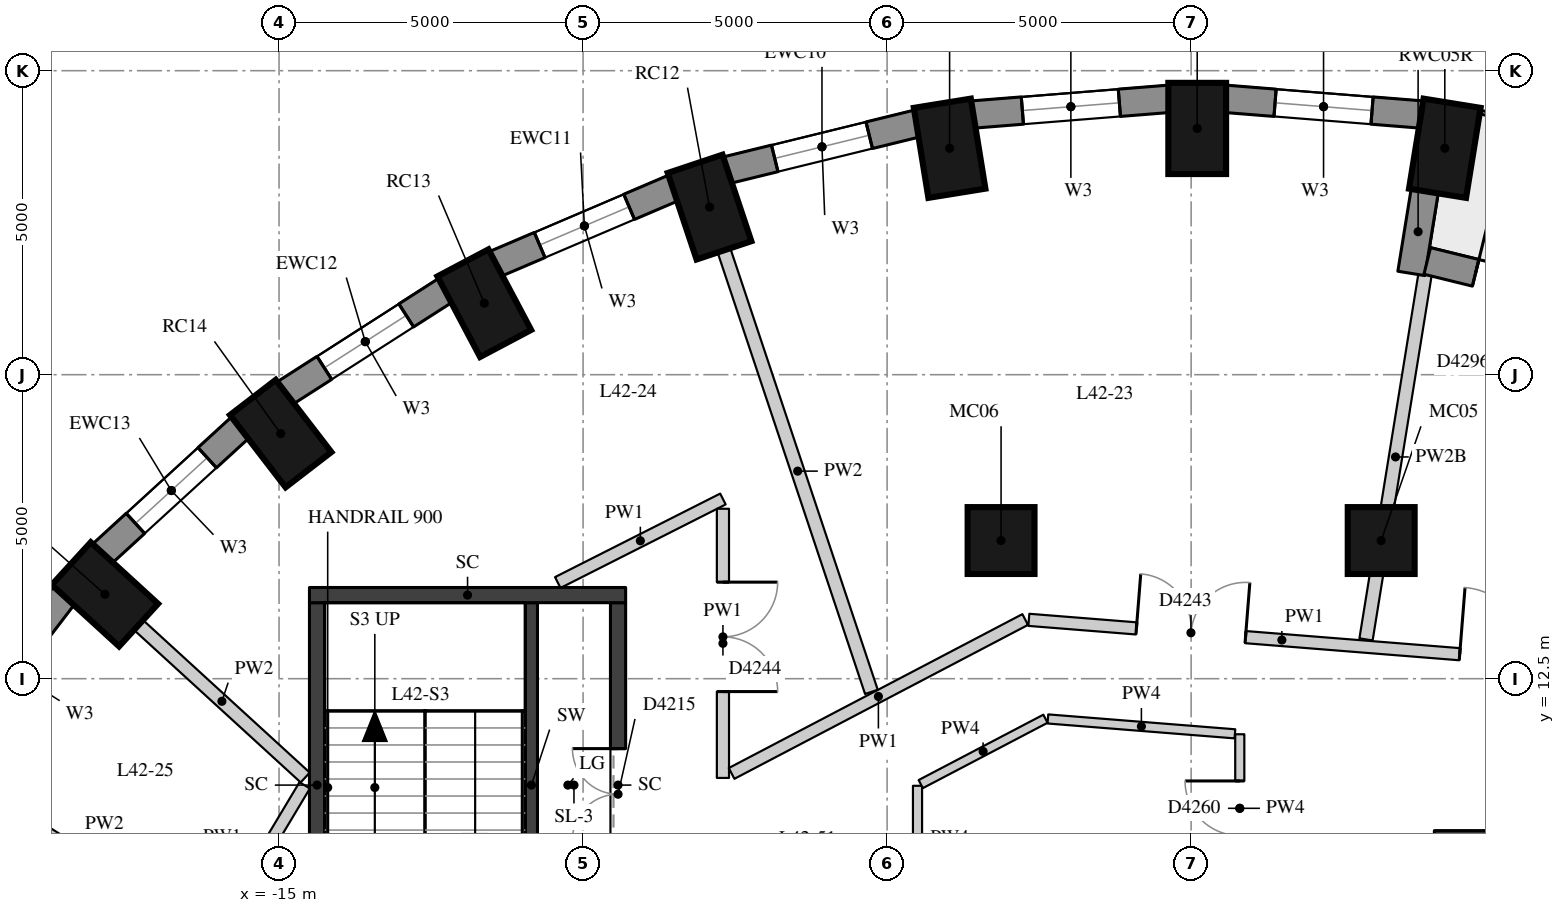
"""IFC4 building model, lengths in metres.
Left out: names, types, materials, properties, quantities, classifications, styles, units other than length and angle.
Written with IfcOpenShell. Run it as: python <this file> out.ifc"""

import sys

from ifc_helpers import new_model, si_unit, direction, frame, frame_2d, origin, origin_2d, place, context, subcontext, project, spatial, rectangle, extrude, element, fill, save


model = new_model("IFC4")
c1 = context("Model", 3, precision=1e-05, world=origin(), true_north=direction((0.0, 1.0)))
c2 = subcontext(c1, "Body", "Model", "MODEL_VIEW")
j1 = project(units=[si_unit("LENGTHUNIT", "METRE"), si_unit("PLANEANGLEUNIT", "RADIAN")], contexts=[c1])
p1 = place(None, origin())
s1 = spatial("IfcSite", under=j1, at=p1, CompositionType="ELEMENT")
p2 = place(p1, origin())
s2 = spatial("IfcBuilding", under=s1, at=p2, CompositionType="ELEMENT")
p3 = place(p2, frame((0.0, 0.0, 151.7)))
s3 = spatial("IfcBuildingStorey", under=s2, at=p3, CompositionType="ELEMENT", Elevation=151.7)
for number, where, z_axis, x_axis in (
    (1, (4.172, 21.224, 0.0), (0.0, 0.0, 1.0), (0.16, 0.987, 0.0)),
    (2, (0.1, 21.55, 0.0), (0.0, 0.0, 1.0), (0.0, 1.0, 0.0)),
    (3, (-3.972, 21.224, 0.0), (0.0, 0.0, 1.0), (-0.16, 0.987, 0.0)),
    (4, (-7.92, 20.256, 0.0), (0.0, 0.0, 1.0), (-0.317, 0.949, 0.0)),
    (5, (-11.625, 18.676, 0.0), (0.0, 0.0, 1.0), (-0.468, 0.884, 0.0)),
    (6, (-14.973, 16.532, 0.0), (0.0, 0.0, 1.0), (-0.61, 0.792, 0.0)),
    (7, (-17.864, 13.888, 0.0), (0.0, 0.0, 1.0), (-0.738, 0.675, 0.0)),
):
    element("IfcColumn", number, at=place(p3, frame(where, z_axis=z_axis, x_axis=x_axis)), inside=s3, PredefinedType="COLUMN", context=c2, shape_type="SweptSolid", body=[
        extrude(rectangle(XDim=1.5, YDim=0.95, at=origin_2d()), origin(), (0.0, 0.0, 1.0), 3.3),
    ])
for number, where, z_axis, x_axis in (
    (8, (3.126, 14.772, 0.0), (0.0, 0.0, 1.0), (1.0, 0.0, 0.0)),
    (9, (-3.126, 14.772, 0.0), (0.0, 0.0, 1.0), (1.0, 0.0, 0.0)),
):
    element("IfcColumn", number, at=place(p3, frame(where, z_axis=z_axis, x_axis=x_axis)), inside=s3, PredefinedType="COLUMN", context=c2, shape_type="SweptSolid", body=[
        extrude(rectangle(XDim=1.1, YDim=1.1, at=origin_2d()), origin(), (0.0, 0.0, 1.0), 3.3),
    ])
p4 = place(p3, frame((3.801, 21.778, 0.0), z_axis=(0.0, 0.0, 1.0), x_axis=(-0.996812416891, 0.079780984773, 0.0)))
e10 = element("IfcWall", 10, at=p4, inside=s3, PredefinedType="SOLIDWALL", context=c2, shape_type="SweptSolid", body=[
    extrude(rectangle(XDim=3.256, YDim=0.45, at=frame_2d((1.628, 0.0))), origin(), (0.0, 0.0, 1.0), 3.02),
])
p5 = place(p4, frame((0.828, 0.0, 0.4)))
e11 = element("IfcOpeningElement", 11, at=p5, cuts=e10, PredefinedType="OPENING", context=c2, shape_type="SweptSolid", body=[
    extrude(rectangle(XDim=1.6, YDim=1.75, at=frame_2d((0.8, 0.875))), frame((0.0, 0.235, 0.0), z_axis=(0.0, -1.0, 0.0), x_axis=(1.0, 0.0, 0.0)), (0.0, 0.0, 1.0), 0.47),
])
p6 = place(p3, frame((-0.355, 22.038, 0.0), z_axis=(0.0, 0.0, 1.0), x_axis=(-0.996812416891, -0.079780984773, 0.0)))
e12 = element("IfcWall", 12, at=p6, inside=s3, PredefinedType="SOLIDWALL", context=c2, shape_type="SweptSolid", body=[
    extrude(rectangle(XDim=3.256, YDim=0.45, at=frame_2d((1.628, 0.0))), origin(), (0.0, 0.0, 1.0), 3.02),
])
p7 = place(p6, frame((0.828, 0.0, 0.4)))
e13 = element("IfcOpeningElement", 13, at=p7, cuts=e12, PredefinedType="OPENING", context=c2, shape_type="SweptSolid", body=[
    extrude(rectangle(XDim=1.6, YDim=1.75, at=frame_2d((0.8, 0.875))), frame((0.0, 0.235, 0.0), z_axis=(0.0, -1.0, 0.0), x_axis=(1.0, 0.0, 0.0)), (0.0, 0.0, 1.0), 0.47),
])
p8 = place(p3, frame((-4.499, 21.633, 0.0), z_axis=(0.0, 0.0, 1.0), x_axis=(-0.971232901476, -0.238131583563, 0.0)))
e14 = element("IfcWall", 14, at=p8, inside=s3, PredefinedType="SOLIDWALL", context=c2, shape_type="SweptSolid", body=[
    extrude(rectangle(XDim=3.237, YDim=0.45, at=frame_2d((1.618, 0.0))), origin(), (0.0, 0.0, 1.0), 3.02),
])
p9 = place(p8, frame((0.818, 0.0, 0.4)))
e15 = element("IfcOpeningElement", 15, at=p9, cuts=e14, PredefinedType="OPENING", context=c2, shape_type="SweptSolid", body=[
    extrude(rectangle(XDim=1.6, YDim=1.75, at=frame_2d((0.8, 0.875))), frame((0.0, 0.235, 0.0), z_axis=(0.0, -1.0, 0.0), x_axis=(1.0, 0.0, 0.0)), (0.0, 0.0, 1.0), 0.47),
])
p10 = place(p3, frame((-8.506, 20.574, 0.0), z_axis=(0.0, 0.0, 1.0), x_axis=(-0.919798725687, -0.392390499663, 0.0)))
e16 = element("IfcWall", 16, at=p10, inside=s3, PredefinedType="SOLIDWALL", context=c2, shape_type="SweptSolid", body=[
    extrude(rectangle(XDim=3.2, YDim=0.45, at=frame_2d((1.6, 0.0))), origin(), (0.0, 0.0, 1.0), 3.02),
])
p11 = place(p10, frame((0.8, 0.0, 0.4)))
e17 = element("IfcOpeningElement", 17, at=p11, cuts=e16, PredefinedType="OPENING", context=c2, shape_type="SweptSolid", body=[
    extrude(rectangle(XDim=1.6, YDim=1.75, at=frame_2d((0.8, 0.875))), frame((0.0, 0.235, 0.0), z_axis=(0.0, -1.0, 0.0), x_axis=(1.0, 0.0, 0.0)), (0.0, 0.0, 1.0), 0.47),
])
p12 = place(p3, frame((-12.255, 18.893, 0.0), z_axis=(0.0, 0.0, 1.0), x_axis=(-0.842030726237, -0.539429565442, 0.0)))
e18 = element("IfcWall", 18, at=p12, inside=s3, PredefinedType="SOLIDWALL", context=c2, shape_type="SweptSolid", body=[
    extrude(rectangle(XDim=3.151, YDim=0.45, at=frame_2d((1.576, 0.0))), origin(), (0.0, 0.0, 1.0), 3.02),
])
p13 = place(p12, frame((0.776, 0.0, 0.4)))
e19 = element("IfcOpeningElement", 19, at=p13, cuts=e18, PredefinedType="OPENING", context=c2, shape_type="SweptSolid", body=[
    extrude(rectangle(XDim=1.6, YDim=1.75, at=frame_2d((0.8, 0.875))), frame((0.0, 0.235, 0.0), z_axis=(0.0, -1.0, 0.0), x_axis=(1.0, 0.0, 0.0)), (0.0, 0.0, 1.0), 0.47),
])
p14 = place(p3, frame((-15.63, 16.639, 0.0), z_axis=(0.0, 0.0, 1.0), x_axis=(-0.737808755941, -0.675009807082, 0.0)))
e20 = element("IfcWall", 20, at=p14, inside=s3, PredefinedType="SOLIDWALL", context=c2, shape_type="SweptSolid", body=[
    extrude(rectangle(XDim=3.094, YDim=0.45, at=frame_2d((1.547, 0.0))), origin(), (0.0, 0.0, 1.0), 3.02),
])
p15 = place(p14, frame((0.747, 0.0, 0.4)))
e21 = element("IfcOpeningElement", 21, at=p15, cuts=e20, PredefinedType="OPENING", context=c2, shape_type="SweptSolid", body=[
    extrude(rectangle(XDim=1.6, YDim=1.75, at=frame_2d((0.8, 0.875))), frame((0.0, 0.235, 0.0), z_axis=(0.0, -1.0, 0.0), x_axis=(1.0, 0.0, 0.0)), (0.0, 0.0, 1.0), 0.47),
])
p16 = place(p3, frame((-18.528, 13.879, 0.0), z_axis=(0.0, 0.0, 1.0), x_axis=(-0.607817056371, -0.794077090706, 0.0)))
e22 = element("IfcWall", 22, at=p16, inside=s3, PredefinedType="SOLIDWALL", context=c2, shape_type="SweptSolid", body=[
    extrude(rectangle(XDim=3.037, YDim=0.45, at=frame_2d((1.519, 0.0))), origin(), (0.0, 0.0, 1.0), 3.02),
])
p17 = place(p16, frame((0.719, 0.0, 0.4)))
e23 = element("IfcOpeningElement", 23, at=p17, cuts=e22, PredefinedType="OPENING", context=c2, shape_type="SweptSolid", body=[
    extrude(rectangle(XDim=1.6, YDim=1.75, at=frame_2d((0.8, 0.875))), frame((0.0, 0.235, 0.0), z_axis=(0.0, -1.0, 0.0), x_axis=(1.0, 0.0, 0.0)), (0.0, 0.0, 1.0), 0.47),
])
p18 = place(p3, frame((3.844, 20.538, 0.0), z_axis=(0.0, 0.0, 1.0), x_axis=(-0.159641024018, -0.98717513312, 0.0)))
e24 = element("IfcWall", 24, at=p18, inside=s3, PredefinedType="SOLIDWALL", context=c2, shape_type="SweptSolid", body=[
    extrude(rectangle(XDim=1.39, YDim=0.45, at=frame_2d((0.695, 0.0))), origin(), (0.0, 0.0, 1.0), 2.57),
])
p19 = place(p3, frame((7.563, 18.466, 0.0), z_axis=(0.0, 0.0, 1.0), x_axis=(-0.97110866251, 0.238637728782, 0.0)))
e25 = element("IfcWall", 25, at=p19, inside=s3, PredefinedType="SOLIDWALL", context=c2, shape_type="SweptSolid", body=[
    extrude(rectangle(XDim=3.789, YDim=0.45, at=frame_2d((1.895, 0.0))), origin(), (0.0, 0.0, 1.0), 3.02),
])
p20 = place(p19, frame((0.82, 0.0, 0.4)))
e26 = element("IfcOpeningElement", 26, at=p20, cuts=e25, PredefinedType="OPENING", context=c2, shape_type="SweptSolid", body=[
    extrude(rectangle(XDim=1.0, YDim=1.75, at=frame_2d((0.5, 0.875))), frame((0.0, 0.235, 0.0), z_axis=(0.0, -1.0, 0.0), x_axis=(1.0, 0.0, 0.0)), (0.0, 0.0, 1.0), 0.47),
])
p21 = place(p19, frame((1.97, 0.0, 0.0)))
e27 = element("IfcOpeningElement", 27, at=p21, cuts=e25, PredefinedType="OPENING", context=c2, shape_type="SweptSolid", body=[
    extrude(rectangle(XDim=1.0, YDim=2.15, at=frame_2d((0.5, 1.075))), frame((0.0, 0.235, 0.0), z_axis=(0.0, -1.0, 0.0), x_axis=(1.0, 0.0, 0.0)), (0.0, 0.0, 1.0), 0.47),
])
p22 = place(p3, frame((4.0, 9.7, 0.0), z_axis=(0.0, 0.0, 1.0), x_axis=(1.0, 0.0, 0.0)))
e28 = element("IfcWall", 28, at=p22, inside=s3, PredefinedType="SHEAR", context=c2, shape_type="SweptSolid", body=[
    extrude(rectangle(XDim=12.0, YDim=0.6, at=frame_2d((6.0, 0.0))), origin(), (0.0, 0.0, 1.0), 3.02),
])
p23 = place(p3, frame((-10.85, 7.75, 0.0), z_axis=(0.0, 0.0, 1.0), x_axis=(0.0, 1.0, 0.0)))
e29 = element("IfcWall", 29, at=p23, inside=s3, PredefinedType="SHEAR", context=c2, shape_type="SweptSolid", body=[
    extrude(rectangle(XDim=6.0, YDim=0.2, at=frame_2d((3.0, 0.0))), origin(), (0.0, 0.0, 1.0), 3.02),
])
p24 = place(p23, frame((0.1, 0.0, 0.0)))
e30 = element("IfcOpeningElement", 30, at=p24, cuts=e29, PredefinedType="OPENING", context=c2, shape_type="SweptSolid", body=[
    extrude(rectangle(XDim=1.5, YDim=2.1, at=frame_2d((0.75, 1.05))), frame((0.0, 0.11, 0.0), z_axis=(0.0, -1.0, 0.0), x_axis=(1.0, 0.0, 0.0)), (0.0, 0.0, 1.0), 0.22),
])
p25 = place(p3, frame((-14.375, 7.75, -0.28), z_axis=(0.0, 0.0, 1.0), x_axis=(0.0, 1.0, 0.0)))
e31 = element("IfcWall", 31, at=p25, inside=s3, PredefinedType="SHEAR", context=c2, shape_type="SweptSolid", body=[
    extrude(rectangle(XDim=6.0, YDim=0.25, at=frame_2d((3.0, 0.0))), origin(), (0.0, 0.0, 1.0), 3.3),
])
p26 = place(p3, frame((-9.425, 7.75, -0.28), z_axis=(0.0, 0.0, 1.0), x_axis=(0.0, 1.0, 0.0)))
e32 = element("IfcWall", 32, at=p26, inside=s3, PredefinedType="SHEAR", context=c2, shape_type="SweptSolid", body=[
    extrude(rectangle(XDim=6.0, YDim=0.25, at=frame_2d((3.0, 0.0))), origin(), (0.0, 0.0, 1.0), 3.3),
])
p27 = place(p26, frame((2.1, 0.0, 0.28)))
e33 = element("IfcOpeningElement", 33, at=p27, cuts=e32, PredefinedType="OPENING", context=c2, shape_type="SweptSolid", body=[
    extrude(rectangle(XDim=1.5, YDim=2.1, at=frame_2d((0.75, 1.05))), frame((0.0, 0.135, 0.0), z_axis=(0.0, -1.0, 0.0), x_axis=(1.0, 0.0, 0.0)), (0.0, 0.0, 1.0), 0.27),
])
p28 = place(p3, frame((-14.5, 13.875, -0.28), z_axis=(0.0, 0.0, 1.0), x_axis=(1.0, 0.0, 0.0)))
e34 = element("IfcWall", 34, at=p28, inside=s3, PredefinedType="SHEAR", context=c2, shape_type="SweptSolid", body=[
    extrude(rectangle(XDim=5.2, YDim=0.25, at=frame_2d((2.6, 0.0))), origin(), (0.0, 0.0, 1.0), 3.3),
])
p29 = place(p3, frame((-16.228, 7.992, 0.0), z_axis=(0.0, 0.0, 1.0), x_axis=(0.513936465122, 0.857828251935, 0.0)))
e35 = element("IfcWall", 35, at=p29, inside=s3, PredefinedType="PARTITIONING", context=c2, shape_type="SweptSolid", body=[
    extrude(rectangle(XDim=3.21, YDim=0.2, at=frame_2d((1.605, 0.0))), origin(), (0.0, 0.0, 1.0), 3.02),
])
p30 = place(p29, frame((0.848, 0.0, 0.0)))
e36 = element("IfcOpeningElement", 36, at=p30, cuts=e35, PredefinedType="OPENING", context=c2, shape_type="SweptSolid", body=[
    extrude(rectangle(XDim=0.9, YDim=2.1, at=frame_2d((0.45, 1.05))), frame((0.0, 0.11, 0.0), z_axis=(0.0, -1.0, 0.0), x_axis=(1.0, 0.0, 0.0)), (0.0, 0.0, 1.0), 0.22),
])
p31 = place(p3, frame((-10.416, 14.082, 0.0), z_axis=(0.0, 0.0, 1.0), x_axis=(0.892396808139, 0.451251522793, 0.0)))
e37 = element("IfcWall", 37, at=p31, inside=s3, PredefinedType="PARTITIONING", context=c2, shape_type="SweptSolid", body=[
    extrude(rectangle(XDim=3.044, YDim=0.2, at=frame_2d((1.522, 0.0))), origin(), (0.0, 0.0, 1.0), 3.02),
])
p32 = place(p3, frame((-7.7, 15.295, 0.0), z_axis=(0.0, 0.0, 1.0), x_axis=(0.0, -1.0, 0.0)))
e38 = element("IfcWall", 38, at=p32, inside=s3, PredefinedType="PARTITIONING", context=c2, shape_type="SweptSolid", body=[
    extrude(rectangle(XDim=4.427, YDim=0.2, at=frame_2d((2.214, 0.0))), origin(), (0.0, 0.0, 1.0), 3.02),
])
p33 = place(p32, frame((1.207, 0.0, 0.0)))
e39 = element("IfcOpeningElement", 39, at=p33, cuts=e38, PredefinedType="OPENING", context=c2, shape_type="SweptSolid", body=[
    extrude(rectangle(XDim=1.8, YDim=2.1, at=frame_2d((0.9, 1.05))), frame((0.0, 0.11, 0.0), z_axis=(0.0, -1.0, 0.0), x_axis=(1.0, 0.0, 0.0)), (0.0, 0.0, 1.0), 0.22),
])
p34 = place(p3, frame((-7.557, 10.942, 0.0), z_axis=(0.0, 0.0, 1.0), x_axis=(0.885672830659, 0.464309850244, 0.0)))
e40 = element("IfcWall", 40, at=p34, inside=s3, PredefinedType="PARTITIONING", context=c2, shape_type="SweptSolid", body=[
    extrude(rectangle(XDim=5.452, YDim=0.2, at=frame_2d((2.726, 0.0))), origin(), (0.0, 0.0, 1.0), 3.02),
])
p35 = place(p3, frame((-2.669, 13.468, 0.0), z_axis=(0.0, 0.0, 1.0), x_axis=(0.996831622407, -0.079540659849, 0.0)))
e41 = element("IfcWall", 41, at=p35, inside=s3, PredefinedType="PARTITIONING", context=c2, shape_type="SweptSolid", body=[
    extrude(rectangle(XDim=8.349, YDim=0.2, at=frame_2d((4.174, 0.0))), origin(), (0.0, 0.0, 1.0), 3.02),
])
p36 = place(p35, frame((7.109, 0.0, 0.0)))
e42 = element("IfcOpeningElement", 42, at=p36, cuts=e41, PredefinedType="OPENING", context=c2, shape_type="SweptSolid", body=[
    extrude(rectangle(XDim=1.1, YDim=2.1, at=frame_2d((0.55, 1.05))), frame((0.0, 0.11, 0.0), z_axis=(0.0, -1.0, 0.0), x_axis=(1.0, 0.0, 0.0)), (0.0, 0.0, 1.0), 0.22),
])
p37 = place(p35, frame((1.775, 0.0, 0.0)))
e43 = element("IfcOpeningElement", 43, at=p37, cuts=e41, PredefinedType="OPENING", context=c2, shape_type="SweptSolid", body=[
    extrude(rectangle(XDim=1.8, YDim=2.1, at=frame_2d((0.9, 1.05))), frame((0.0, 0.11, 0.0), z_axis=(0.0, -1.0, 0.0), x_axis=(1.0, 0.0, 0.0)), (0.0, 0.0, 1.0), 0.22),
])
p38 = place(p3, frame((0.8, 11.586, 0.0), z_axis=(0.0, 0.0, 1.0), x_axis=(0.0, -1.0, 0.0)))
e44 = element("IfcWall", 44, at=p38, inside=s3, PredefinedType="PARTITIONING", context=c2, shape_type="SweptSolid", body=[
    extrude(rectangle(XDim=2.436, YDim=0.15, at=frame_2d((1.218, 0.0))), origin(), (0.0, 0.0, 1.0), 3.02),
])
p39 = place(p38, frame((0.768, 0.0, 0.0)))
e45 = element("IfcOpeningElement", 45, at=p39, cuts=e44, PredefinedType="OPENING", context=c2, shape_type="SweptSolid", body=[
    extrude(rectangle(XDim=0.9, YDim=2.1, at=frame_2d((0.45, 1.05))), frame((0.0, 0.085, 0.0), z_axis=(0.0, -1.0, 0.0), x_axis=(1.0, 0.0, 0.0)), (0.0, 0.0, 1.0), 0.17),
])
p40 = place(p3, frame((-4.5, 7.942, 0.0), z_axis=(0.0, 0.0, 1.0), x_axis=(0.0, 1.0, 0.0)))
e46 = element("IfcWall", 46, at=p40, inside=s3, PredefinedType="PARTITIONING", context=c2, shape_type="SweptSolid", body=[
    extrude(rectangle(XDim=2.796, YDim=0.15, at=frame_2d((1.398, 0.0))), origin(), (0.0, 0.0, 1.0), 3.02),
])
p41 = place(p3, frame((-4.447, 10.766, 0.0), z_axis=(0.0, 0.0, 1.0), x_axis=(0.885701482048, 0.464255193507, 0.0)))
e47 = element("IfcWall", 47, at=p41, inside=s3, PredefinedType="PARTITIONING", context=c2, shape_type="SweptSolid", body=[
    extrude(rectangle(XDim=2.315, YDim=0.15, at=frame_2d((1.158, 0.0))), origin(), (0.0, 0.0, 1.0), 3.02),
])
p42 = place(p3, frame((-2.356, 11.838, 0.0), z_axis=(0.0, 0.0, 1.0), x_axis=(0.996845649151, -0.079364675829, 0.0)))
e48 = element("IfcWall", 48, at=p42, inside=s3, PredefinedType="PARTITIONING", context=c2, shape_type="SweptSolid", body=[
    extrude(rectangle(XDim=3.085, YDim=0.15, at=frame_2d((1.543, 0.0))), origin(), (0.0, 0.0, 1.0), 3.02),
])
p43 = place(p3, frame((3.847, 19.148, 0.0), z_axis=(0.0, 0.0, 1.0), x_axis=(-0.159656618209, -0.987172611179, 0.0)))
e49 = element("IfcWall", 49, at=p43, inside=s3, PredefinedType="PARTITIONING", context=c2, shape_type="SweptSolid", body=[
    extrude(rectangle(XDim=6.08, YDim=0.22, at=frame_2d((3.04, 0.0))), origin(), (0.0, 0.0, 1.0), 2.57),
])
p44 = place(p3, frame((-7.683, 19.545, 0.0), z_axis=(0.0, 0.0, 1.0), x_axis=(0.316706037399, -0.94852374028, 0.0)))
e50 = element("IfcWall", 50, at=p44, inside=s3, PredefinedType="PARTITIONING", context=c2, shape_type="SweptSolid", body=[
    extrude(rectangle(XDim=7.656, YDim=0.22, at=frame_2d((3.828, 0.0))), origin(), (0.0, 0.0, 1.0), 3.02),
])
p45 = place(p3, frame((-17.31, 13.382, 0.0), z_axis=(0.0, 0.0, 1.0), x_axis=(0.737860436015, -0.674953314655, 0.0)))
e51 = element("IfcWall", 51, at=p45, inside=s3, PredefinedType="PARTITIONING", context=c2, shape_type="SweptSolid", body=[
    extrude(rectangle(XDim=3.714, YDim=0.22, at=frame_2d((1.857, 0.0))), origin(), (0.0, 0.0, 1.0), 3.02),
])
p46 = place(p3, frame((-19.573, 10.426, 0.0), z_axis=(0.0, 0.0, 1.0), x_axis=(0.846298736827, -0.532708595805, 0.0)))
e52 = element("IfcWall", 52, at=p46, inside=s3, PredefinedType="PARTITIONING", context=c2, shape_type="SweptSolid", body=[
    extrude(rectangle(XDim=4.021, YDim=0.22, at=frame_2d((2.011, 0.0))), origin(), (0.0, 0.0, 1.0), 3.02),
])
p47 = place(p5, origin())
e53 = element("IfcWindow", 53, at=p47, inside=s3, PartitioningType="SINGLE_PANEL", PredefinedType="WINDOW", context=c2, shape_type="SweptSolid", body=[
    extrude(rectangle(XDim=1.6, YDim=1.75, at=frame_2d((0.8, 0.875))), frame((0.0, 0.035, 0.0), z_axis=(0.0, -1.0, 0.0), x_axis=(1.0, 0.0, 0.0)), (0.0, 0.0, 1.0), 0.06),
])
fill(e11, e53)
p48 = place(p7, origin())
e54 = element("IfcWindow", 54, at=p48, inside=s3, PartitioningType="SINGLE_PANEL", PredefinedType="WINDOW", context=c2, shape_type="SweptSolid", body=[
    extrude(rectangle(XDim=1.6, YDim=1.75, at=frame_2d((0.8, 0.875))), frame((0.0, 0.035, 0.0), z_axis=(0.0, -1.0, 0.0), x_axis=(1.0, 0.0, 0.0)), (0.0, 0.0, 1.0), 0.06),
])
fill(e13, e54)
p49 = place(p9, origin())
e55 = element("IfcWindow", 55, at=p49, inside=s3, PartitioningType="SINGLE_PANEL", PredefinedType="WINDOW", context=c2, shape_type="SweptSolid", body=[
    extrude(rectangle(XDim=1.6, YDim=1.75, at=frame_2d((0.8, 0.875))), frame((0.0, 0.035, 0.0), z_axis=(0.0, -1.0, 0.0), x_axis=(1.0, 0.0, 0.0)), (0.0, 0.0, 1.0), 0.06),
])
fill(e15, e55)
p50 = place(p11, origin())
e56 = element("IfcWindow", 56, at=p50, inside=s3, PartitioningType="SINGLE_PANEL", PredefinedType="WINDOW", context=c2, shape_type="SweptSolid", body=[
    extrude(rectangle(XDim=1.6, YDim=1.75, at=frame_2d((0.8, 0.875))), frame((0.0, 0.035, 0.0), z_axis=(0.0, -1.0, 0.0), x_axis=(1.0, 0.0, 0.0)), (0.0, 0.0, 1.0), 0.06),
])
fill(e17, e56)
p51 = place(p13, origin())
e57 = element("IfcWindow", 57, at=p51, inside=s3, PartitioningType="SINGLE_PANEL", PredefinedType="WINDOW", context=c2, shape_type="SweptSolid", body=[
    extrude(rectangle(XDim=1.6, YDim=1.75, at=frame_2d((0.8, 0.875))), frame((0.0, 0.035, 0.0), z_axis=(0.0, -1.0, 0.0), x_axis=(1.0, 0.0, 0.0)), (0.0, 0.0, 1.0), 0.06),
])
fill(e19, e57)
p52 = place(p15, origin())
e58 = element("IfcWindow", 58, at=p52, inside=s3, PartitioningType="SINGLE_PANEL", PredefinedType="WINDOW", context=c2, shape_type="SweptSolid", body=[
    extrude(rectangle(XDim=1.6, YDim=1.75, at=frame_2d((0.8, 0.875))), frame((0.0, 0.035, 0.0), z_axis=(0.0, -1.0, 0.0), x_axis=(1.0, 0.0, 0.0)), (0.0, 0.0, 1.0), 0.06),
])
fill(e21, e58)
p53 = place(p21, frame((1.0, 0.0, 0.0), z_axis=(0.0, 0.0, 1.0), x_axis=(-1.0, 0.0, 0.0)))
e59 = element("IfcDoor", 59, at=p53, inside=s3, OperationType="SINGLE_SWING_LEFT", PredefinedType="DOOR", context=c2, shape_type="SweptSolid", body=[
    extrude(rectangle(XDim=1.0, YDim=2.15, at=frame_2d((0.5, 1.075))), frame((0.0, 0.075, 0.0), z_axis=(0.0, -1.0, 0.0), x_axis=(1.0, 0.0, 0.0)), (0.0, 0.0, 1.0), 0.05),
])
fill(e27, e59)
p54 = place(p27, origin())
e60 = element("IfcDoor", 60, at=p54, inside=s3, OperationType="DOUBLE_DOOR_SINGLE_SWING", PredefinedType="DOOR", context=c2, shape_type="SweptSolid", body=[
    extrude(rectangle(XDim=1.5, YDim=2.1, at=frame_2d((0.75, 1.05))), frame((0.0, 0.025, 0.0), z_axis=(0.0, -1.0, 0.0), x_axis=(1.0, 0.0, 0.0)), (0.0, 0.0, 1.0), 0.05),
])
fill(e33, e60)
p55 = place(p36, origin())
e61 = element("IfcDoor", 61, at=p55, inside=s3, OperationType="SINGLE_SWING_LEFT", PredefinedType="DOOR", context=c2, shape_type="SweptSolid", body=[
    extrude(rectangle(XDim=1.1, YDim=2.1, at=frame_2d((0.55, 1.05))), frame((0.0, 0.025, 0.0), z_axis=(0.0, -1.0, 0.0), x_axis=(1.0, 0.0, 0.0)), (0.0, 0.0, 1.0), 0.05),
])
fill(e42, e61)
p56 = place(p37, origin())
e62 = element("IfcDoor", 62, at=p56, inside=s3, OperationType="DOUBLE_DOOR_SINGLE_SWING", PredefinedType="DOOR", context=c2, shape_type="SweptSolid", body=[
    extrude(rectangle(XDim=1.8, YDim=2.1, at=frame_2d((0.9, 1.05))), frame((0.0, 0.025, 0.0), z_axis=(0.0, -1.0, 0.0), x_axis=(1.0, 0.0, 0.0)), (0.0, 0.0, 1.0), 0.05),
])
fill(e43, e62)
p57 = place(p33, origin())
e63 = element("IfcDoor", 63, at=p57, inside=s3, OperationType="DOUBLE_DOOR_SINGLE_SWING", PredefinedType="DOOR", context=c2, shape_type="SweptSolid", body=[
    extrude(rectangle(XDim=1.8, YDim=2.1, at=frame_2d((0.9, 1.05))), frame((0.0, 0.025, 0.0), z_axis=(0.0, -1.0, 0.0), x_axis=(1.0, 0.0, 0.0)), (0.0, 0.0, 1.0), 0.05),
])
fill(e39, e63)
p58 = place(p39, origin())
e64 = element("IfcDoor", 64, at=p58, inside=s3, OperationType="SINGLE_SWING_RIGHT", PredefinedType="DOOR", context=c2, shape_type="SweptSolid", body=[
    extrude(rectangle(XDim=0.9, YDim=2.1, at=frame_2d((0.45, 1.05))), frame((0.0, 0.025, 0.0), z_axis=(0.0, -1.0, 0.0), x_axis=(1.0, 0.0, 0.0)), (0.0, 0.0, 1.0), 0.05),
])
fill(e45, e64)
save(model, sys.argv[1])
